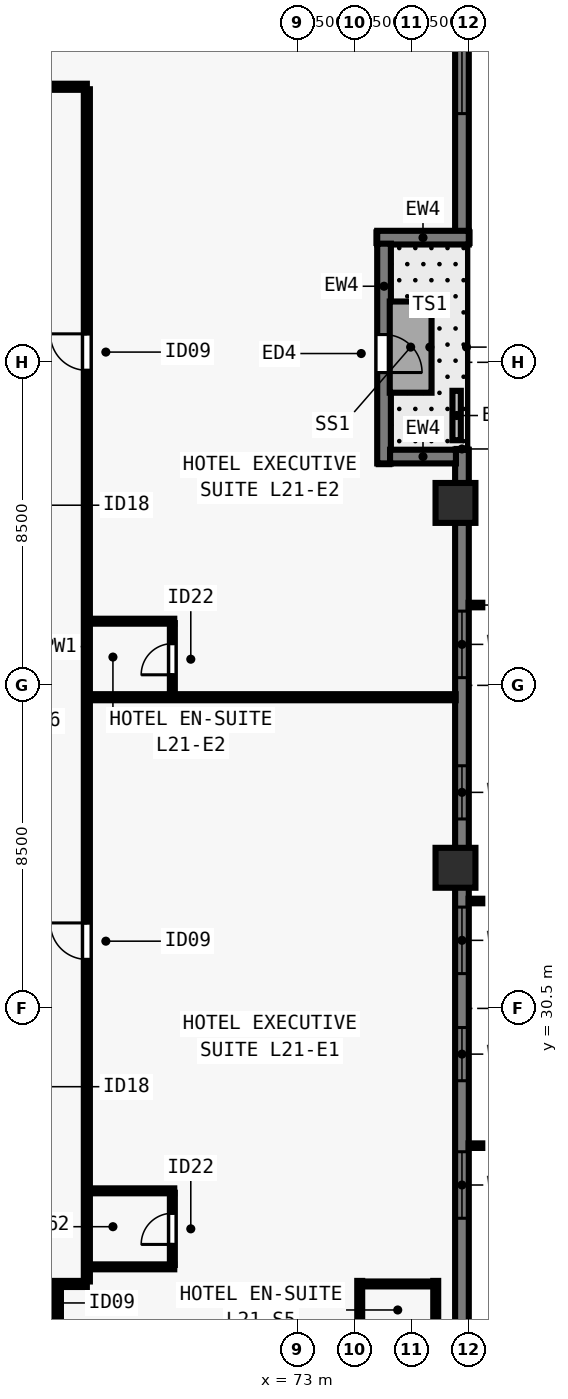
"""IFC4 building model, lengths in metres.
Left out: names, types, materials, properties, quantities, classifications, styles, units other than length and angle.
Written with IfcOpenShell. Run it as: python <this file> out.ifc"""

import sys

from ifc_helpers import new_model, si_unit, direction, frame, frame_2d, origin, origin_2d, place, context, subcontext, project, spatial, rectangle, extrude, element, fill, save


model = new_model("IFC4")
c1 = context("Model", 3, precision=1e-05, world=origin(), true_north=direction((0.0, 1.0)))
c2 = subcontext(c1, "Body", "Model", "MODEL_VIEW")
j1 = project(units=[si_unit("LENGTHUNIT", "METRE"), si_unit("PLANEANGLEUNIT", "RADIAN")], contexts=[c1])
p1 = place(None, origin())
s1 = spatial("IfcSite", under=j1, at=p1, CompositionType="ELEMENT")
p2 = place(p1, origin())
s2 = spatial("IfcBuilding", under=s1, at=p2, CompositionType="ELEMENT")
p3 = place(p2, frame((0.0, 0.0, 79.5)))
s3 = spatial("IfcBuildingStorey", under=s2, at=p3, CompositionType="ELEMENT", Elevation=79.5)
for number, where, z_axis, x_axis in (
    (1, (77.15, 34.2, 0.0), (0.0, 0.0, 1.0), (0.0, 1.0, 0.0)),
    (2, (77.15, 43.8, 0.0), (0.0, 0.0, 1.0), (0.0, 1.0, 0.0)),
):
    element("IfcColumn", number, at=place(p3, frame(where, z_axis=z_axis, x_axis=x_axis)), inside=s3, PredefinedType="COLUMN", context=c2, shape_type="SweptSolid", body=[
        extrude(rectangle(XDim=1.05, YDim=1.05, at=origin_2d()), origin(), (0.0, 0.0, 1.0), 3.5),
    ])
p4 = place(p3, frame((77.32, 45.2, 0.0), z_axis=(0.0, 0.0, 1.0), x_axis=(0.0, -1.0, 0.0)))
e3 = element("IfcWall", 3, at=p4, inside=s3, PredefinedType="SOLIDWALL", context=c2, shape_type="SweptSolid", body=[
    extrude(rectangle(XDim=28.362, YDim=0.36, at=frame_2d((14.181, 0.0))), origin(), (0.0, 0.0, 1.0), 3.28),
])
p5 = place(p4, frame((4.247, 0.0, 0.8)))
e4 = element("IfcOpeningElement", 4, at=p5, cuts=e3, PredefinedType="OPENING", context=c2, shape_type="SweptSolid", body=[
    extrude(rectangle(XDim=1.75, YDim=1.544, at=frame_2d((0.875, 0.772))), frame((0.0, 0.19, 0.0), z_axis=(0.0, -1.0, 0.0), x_axis=(1.0, 0.0, 0.0)), (0.0, 0.0, 1.0), 0.38),
])
p6 = place(p4, frame((8.315, 0.0, 0.8)))
e5 = element("IfcOpeningElement", 5, at=p6, cuts=e3, PredefinedType="OPENING", context=c2, shape_type="SweptSolid", body=[
    extrude(rectangle(XDim=1.4, YDim=1.544, at=frame_2d((0.7, 0.772))), frame((0.0, 0.19, 0.0), z_axis=(0.0, -1.0, 0.0), x_axis=(1.0, 0.0, 0.0)), (0.0, 0.0, 1.0), 0.38),
])
p7 = place(p4, frame((12.034, 0.0, 0.8)))
e6 = element("IfcOpeningElement", 6, at=p7, cuts=e3, PredefinedType="OPENING", context=c2, shape_type="SweptSolid", body=[
    extrude(rectangle(XDim=1.75, YDim=1.544, at=frame_2d((0.875, 0.772))), frame((0.0, 0.19, 0.0), z_axis=(0.0, -1.0, 0.0), x_axis=(1.0, 0.0, 0.0)), (0.0, 0.0, 1.0), 0.38),
])
p8 = place(p4, frame((15.203, 0.0, 0.8)))
e7 = element("IfcOpeningElement", 7, at=p8, cuts=e3, PredefinedType="OPENING", context=c2, shape_type="SweptSolid", body=[
    extrude(rectangle(XDim=1.4, YDim=1.544, at=frame_2d((0.7, 0.772))), frame((0.0, 0.19, 0.0), z_axis=(0.0, -1.0, 0.0), x_axis=(1.0, 0.0, 0.0)), (0.0, 0.0, 1.0), 0.38),
])
p9 = place(p4, frame((18.471, 0.0, 0.8)))
e8 = element("IfcOpeningElement", 8, at=p9, cuts=e3, PredefinedType="OPENING", context=c2, shape_type="SweptSolid", body=[
    extrude(rectangle(XDim=1.75, YDim=1.544, at=frame_2d((0.875, 0.772))), frame((0.0, 0.19, 0.0), z_axis=(0.0, -1.0, 0.0), x_axis=(1.0, 0.0, 0.0)), (0.0, 0.0, 1.0), 0.38),
])
p10 = place(p3, frame((77.32, 61.5, 0.0), z_axis=(0.0, 0.0, 1.0), x_axis=(0.0, -1.0, 0.0)))
e9 = element("IfcWall", 9, at=p10, inside=s3, PredefinedType="SOLIDWALL", context=c2, shape_type="SweptSolid", body=[
    extrude(rectangle(XDim=10.562, YDim=0.36, at=frame_2d((5.281, 0.0))), origin(), (0.0, 0.0, 1.0), 3.28),
])
p11 = place(p10, frame((5.706, 0.0, 0.8)))
e10 = element("IfcOpeningElement", 10, at=p11, cuts=e9, PredefinedType="OPENING", context=c2, shape_type="SweptSolid", body=[
    extrude(rectangle(XDim=1.75, YDim=1.544, at=frame_2d((0.875, 0.772))), frame((0.0, 0.19, 0.0), z_axis=(0.0, -1.0, 0.0), x_axis=(1.0, 0.0, 0.0)), (0.0, 0.0, 1.0), 0.38),
])
p12 = place(p3, frame((77.5, 50.78, 0.0), z_axis=(0.0, 0.0, 1.0), x_axis=(-1.0, 0.0, 0.0)))
e11 = element("IfcWall", 11, at=p12, inside=s3, PredefinedType="SOLIDWALL", context=c2, shape_type="SweptSolid", body=[
    extrude(rectangle(XDim=2.41, YDim=0.36, at=frame_2d((1.205, 0.0))), origin(), (0.0, 0.0, 1.0), 3.28),
])
p13 = place(p3, frame((75.27, 50.622, 0.0), z_axis=(0.0, 0.0, 1.0), x_axis=(0.0, -1.0, 0.0)))
e12 = element("IfcWall", 12, at=p13, inside=s3, PredefinedType="SOLIDWALL", context=c2, shape_type="SweptSolid", body=[
    extrude(rectangle(XDim=5.782, YDim=0.36, at=frame_2d((2.891, 0.0))), origin(), (0.0, 0.0, 1.0), 3.28),
])
p14 = place(p13, frame((2.391, 0.0, 0.0)))
e13 = element("IfcOpeningElement", 13, at=p14, cuts=e12, PredefinedType="OPENING", context=c2, shape_type="SweptSolid", body=[
    extrude(rectangle(XDim=1.0, YDim=2.15, at=frame_2d((0.5, 1.075))), frame((0.0, 0.19, 0.0), z_axis=(0.0, -1.0, 0.0), x_axis=(1.0, 0.0, 0.0)), (0.0, 0.0, 1.0), 0.38),
])
p15 = place(p3, frame((75.428, 45.02, 0.0), z_axis=(0.0, 0.0, 1.0), x_axis=(1.0, 0.0, 0.0)))
e14 = element("IfcWall", 14, at=p15, inside=s3, PredefinedType="SOLIDWALL", context=c2, shape_type="SweptSolid", body=[
    extrude(rectangle(XDim=1.734, YDim=0.36, at=frame_2d((0.867, 0.0))), origin(), (0.0, 0.0, 1.0), 3.28),
])
p16 = place(p3, frame((77.18, 45.45, 0.0), z_axis=(0.0, 0.0, 1.0), x_axis=(0.0, 1.0, 0.0)))
e15 = element("IfcWall", 15, at=p16, inside=s3, PredefinedType="PARAPET", context=c2, shape_type="SweptSolid", body=[
    extrude(rectangle(XDim=1.3, YDim=0.22, at=frame_2d((0.65, 0.0))), origin(), (0.0, 0.0, 1.0), 0.55),
])
p17 = place(p3, frame((36.55, 23.25, 0.0), z_axis=(0.0, 0.0, 1.0), x_axis=(1.0, 0.0, 0.0)))
e16 = element("IfcWall", 16, at=p17, inside=s3, PredefinedType="PARTITIONING", context=c2, shape_type="SweptSolid", body=[
    extrude(rectangle(XDim=30.9, YDim=0.16, at=frame_2d((15.45, 0.0))), origin(), (0.0, 0.0, 1.0), 3.28),
])
p18 = place(p17, frame((1.13, 0.0, 0.0)))
e17 = element("IfcOpeningElement", 17, at=p18, cuts=e16, PredefinedType="OPENING", context=c2, shape_type="SweptSolid", body=[
    extrude(rectangle(XDim=0.96, YDim=2.15, at=frame_2d((0.48, 1.075))), frame((0.0, 0.09, 0.0), z_axis=(0.0, -1.0, 0.0), x_axis=(1.0, 0.0, 0.0)), (0.0, 0.0, 1.0), 0.18),
])
p19 = place(p17, frame((6.093, 0.0, 0.0)))
e18 = element("IfcOpeningElement", 18, at=p19, cuts=e16, PredefinedType="OPENING", context=c2, shape_type="SweptSolid", body=[
    extrude(rectangle(XDim=0.96, YDim=2.15, at=frame_2d((0.48, 1.075))), frame((0.0, 0.09, 0.0), z_axis=(0.0, -1.0, 0.0), x_axis=(1.0, 0.0, 0.0)), (0.0, 0.0, 1.0), 0.18),
])
p20 = place(p17, frame((16.125, 0.0, 0.0)))
e19 = element("IfcOpeningElement", 19, at=p20, cuts=e16, PredefinedType="OPENING", context=c2, shape_type="SweptSolid", body=[
    extrude(rectangle(XDim=0.96, YDim=2.15, at=frame_2d((0.48, 1.075))), frame((0.0, 0.09, 0.0), z_axis=(0.0, -1.0, 0.0), x_axis=(1.0, 0.0, 0.0)), (0.0, 0.0, 1.0), 0.18),
])
p21 = place(p17, frame((26.157, 0.0, 0.0)))
e20 = element("IfcOpeningElement", 20, at=p21, cuts=e16, PredefinedType="OPENING", context=c2, shape_type="SweptSolid", body=[
    extrude(rectangle(XDim=0.96, YDim=2.15, at=frame_2d((0.48, 1.075))), frame((0.0, 0.09, 0.0), z_axis=(0.0, -1.0, 0.0), x_axis=(1.0, 0.0, 0.0)), (0.0, 0.0, 1.0), 0.18),
])
p22 = place(p17, frame((28.92, 0.0, 0.0)))
e21 = element("IfcOpeningElement", 21, at=p22, cuts=e16, PredefinedType="OPENING", context=c2, shape_type="SweptSolid", body=[
    extrude(rectangle(XDim=0.96, YDim=2.15, at=frame_2d((0.48, 1.075))), frame((0.0, 0.09, 0.0), z_axis=(0.0, -1.0, 0.0), x_axis=(1.0, 0.0, 0.0)), (0.0, 0.0, 1.0), 0.18),
])
p23 = place(p3, frame((36.55, 54.75, 0.0), z_axis=(0.0, 0.0, 1.0), x_axis=(1.0, 0.0, 0.0)))
e22 = element("IfcWall", 22, at=p23, inside=s3, PredefinedType="PARTITIONING", context=c2, shape_type="SweptSolid", body=[
    extrude(rectangle(XDim=30.9, YDim=0.16, at=frame_2d((15.45, 0.0))), origin(), (0.0, 0.0, 1.0), 3.28),
])
p24 = place(p23, frame((2.83, 0.0, 0.0)))
e23 = element("IfcOpeningElement", 23, at=p24, cuts=e22, PredefinedType="OPENING", context=c2, shape_type="SweptSolid", body=[
    extrude(rectangle(XDim=0.96, YDim=2.15, at=frame_2d((0.48, 1.075))), frame((0.0, 0.09, 0.0), z_axis=(0.0, -1.0, 0.0), x_axis=(1.0, 0.0, 0.0)), (0.0, 0.0, 1.0), 0.18),
])
p25 = place(p23, frame((15.965, 0.0, 0.0)))
e24 = element("IfcOpeningElement", 24, at=p25, cuts=e22, PredefinedType="OPENING", context=c2, shape_type="SweptSolid", body=[
    extrude(rectangle(XDim=0.96, YDim=2.15, at=frame_2d((0.48, 1.075))), frame((0.0, 0.09, 0.0), z_axis=(0.0, -1.0, 0.0), x_axis=(1.0, 0.0, 0.0)), (0.0, 0.0, 1.0), 0.18),
])
p26 = place(p23, frame((28.105, 0.0, 0.0)))
e25 = element("IfcOpeningElement", 25, at=p26, cuts=e22, PredefinedType="OPENING", context=c2, shape_type="SweptSolid", body=[
    extrude(rectangle(XDim=0.96, YDim=2.15, at=frame_2d((0.48, 1.075))), frame((0.0, 0.09, 0.0), z_axis=(0.0, -1.0, 0.0), x_axis=(1.0, 0.0, 0.0)), (0.0, 0.0, 1.0), 0.18),
])
p27 = place(p3, frame((67.45, 23.315, 0.0), z_axis=(0.0, 0.0, 1.0), x_axis=(0.0, 1.0, 0.0)))
e26 = element("IfcWall", 26, at=p27, inside=s3, PredefinedType="PARTITIONING", context=c2, shape_type="SweptSolid", body=[
    extrude(rectangle(XDim=31.37, YDim=0.16, at=frame_2d((15.685, 0.0))), origin(), (0.0, 0.0, 1.0), 3.28),
])
p28 = place(p27, frame((8.474, 0.0, 0.0)))
e27 = element("IfcOpeningElement", 27, at=p28, cuts=e26, PredefinedType="OPENING", context=c2, shape_type="SweptSolid", body=[
    extrude(rectangle(XDim=0.96, YDim=2.15, at=frame_2d((0.48, 1.075))), frame((0.0, 0.09, 0.0), z_axis=(0.0, -1.0, 0.0), x_axis=(1.0, 0.0, 0.0)), (0.0, 0.0, 1.0), 0.18),
])
p29 = place(p27, frame((23.974, 0.0, 0.0)))
e28 = element("IfcOpeningElement", 28, at=p29, cuts=e26, PredefinedType="OPENING", context=c2, shape_type="SweptSolid", body=[
    extrude(rectangle(XDim=0.96, YDim=2.15, at=frame_2d((0.48, 1.075))), frame((0.0, 0.09, 0.0), z_axis=(0.0, -1.0, 0.0), x_axis=(1.0, 0.0, 0.0)), (0.0, 0.0, 1.0), 0.18),
])
p30 = place(p3, frame((66.688, 13.845, 0.0), z_axis=(0.0, 0.0, 1.0), x_axis=(0.0, 1.0, 0.0)))
e29 = element("IfcWall", 29, at=p30, inside=s3, PredefinedType="PARTITIONING", context=c2, shape_type="SweptSolid", body=[
    extrude(rectangle(XDim=9.34, YDim=0.16, at=frame_2d((4.67, 0.0))), origin(), (0.0, 0.0, 1.0), 2.439),
])
for number, where, z_axis, x_axis in (
    (30, (76.63, 20.95, 0.0), (0.0, 0.0, 1.0), (0.0, 1.0, 0.0)),
    (31, (74.63, 20.95, 0.0), (0.0, 0.0, 1.0), (0.0, 1.0, 0.0)),
):
    element("IfcWall", number, at=place(p3, frame(where, z_axis=z_axis, x_axis=x_axis)), inside=s3, PredefinedType="PLUMBINGWALL", context=c2, shape_type="SweptSolid", body=[
        extrude(rectangle(XDim=2.38, YDim=0.13, at=frame_2d((1.19, 0.0))), origin(), (0.0, 0.0, 1.0), 3.28),
    ])
p31 = place(p3, frame((74.68, 23.25, 0.0), z_axis=(0.0, 0.0, 1.0), x_axis=(1.0, 0.0, 0.0)))
e32 = element("IfcWall", 32, at=p31, inside=s3, PredefinedType="PLUMBINGWALL", context=c2, shape_type="SweptSolid", body=[
    extrude(rectangle(XDim=1.9, YDim=0.13, at=frame_2d((0.95, 0.0))), origin(), (0.0, 0.0, 1.0), 3.28),
])
p32 = place(p3, frame((67.515, 23.7, 0.0), z_axis=(0.0, 0.0, 1.0), x_axis=(1.0, 0.0, 0.0)))
e33 = element("IfcWall", 33, at=p32, inside=s3, PredefinedType="PLUMBINGWALL", context=c2, shape_type="SweptSolid", body=[
    extrude(rectangle(XDim=2.235, YDim=0.13, at=frame_2d((1.118, 0.0))), origin(), (0.0, 0.0, 1.0), 2.849),
])
p33 = place(p3, frame((67.515, 25.7, 0.0), z_axis=(0.0, 0.0, 1.0), x_axis=(1.0, 0.0, 0.0)))
e34 = element("IfcWall", 34, at=p33, inside=s3, PredefinedType="PLUMBINGWALL", context=c2, shape_type="SweptSolid", body=[
    extrude(rectangle(XDim=2.235, YDim=0.13, at=frame_2d((1.118, 0.0))), origin(), (0.0, 0.0, 1.0), 3.28),
])
p34 = place(p3, frame((69.7, 23.75, 0.0), z_axis=(0.0, 0.0, 1.0), x_axis=(0.0, 1.0, 0.0)))
e35 = element("IfcWall", 35, at=p34, inside=s3, PredefinedType="PLUMBINGWALL", context=c2, shape_type="SweptSolid", body=[
    extrude(rectangle(XDim=1.9, YDim=0.13, at=frame_2d((0.95, 0.0))), origin(), (0.0, 0.0, 1.0), 3.28),
])
p35 = place(p34, frame((0.54, 0.0, 0.0)))
e36 = element("IfcOpeningElement", 36, at=p35, cuts=e35, PredefinedType="OPENING", context=c2, shape_type="SweptSolid", body=[
    extrude(rectangle(XDim=0.82, YDim=2.1, at=frame_2d((0.41, 1.05))), frame((0.0, 0.075, 0.0), z_axis=(0.0, -1.0, 0.0), x_axis=(1.0, 0.0, 0.0)), (0.0, 0.0, 1.0), 0.15),
])
p36 = place(p3, frame((67.515, 38.688, 0.0), z_axis=(0.0, 0.0, 1.0), x_axis=(1.0, 0.0, 0.0)))
e37 = element("IfcWall", 37, at=p36, inside=s3, PredefinedType="PARTITIONING", context=c2, shape_type="SweptSolid", body=[
    extrude(rectangle(XDim=9.64, YDim=0.16, at=frame_2d((4.82, 0.0))), origin(), (0.0, 0.0, 1.0), 3.28),
])
p37 = place(p3, frame((67.515, 40.688, 0.0), z_axis=(0.0, 0.0, 1.0), x_axis=(1.0, 0.0, 0.0)))
e38 = element("IfcWall", 38, at=p37, inside=s3, PredefinedType="PLUMBINGWALL", context=c2, shape_type="SweptSolid", body=[
    extrude(rectangle(XDim=2.235, YDim=0.13, at=frame_2d((1.118, 0.0))), origin(), (0.0, 0.0, 1.0), 3.28),
])
p38 = place(p3, frame((69.7, 38.753, 0.0), z_axis=(0.0, 0.0, 1.0), x_axis=(0.0, 1.0, 0.0)))
e39 = element("IfcWall", 39, at=p38, inside=s3, PredefinedType="PLUMBINGWALL", context=c2, shape_type="SweptSolid", body=[
    extrude(rectangle(XDim=1.885, YDim=0.13, at=frame_2d((0.942, 0.0))), origin(), (0.0, 0.0, 1.0), 3.28),
])
p39 = place(p38, frame((0.525, 0.0, 0.0)))
e40 = element("IfcOpeningElement", 40, at=p39, cuts=e39, PredefinedType="OPENING", context=c2, shape_type="SweptSolid", body=[
    extrude(rectangle(XDim=0.82, YDim=2.1, at=frame_2d((0.41, 1.05))), frame((0.0, 0.075, 0.0), z_axis=(0.0, -1.0, 0.0), x_axis=(1.0, 0.0, 0.0)), (0.0, 0.0, 1.0), 0.15),
])
p40 = place(p5, origin())
e41 = element("IfcWindow", 41, at=p40, inside=s3, PartitioningType="SINGLE_PANEL", PredefinedType="WINDOW", context=c2, shape_type="SweptSolid", body=[
    extrude(rectangle(XDim=1.75, YDim=1.544, at=frame_2d((0.875, 0.772))), frame((0.0, -0.05, 0.0), z_axis=(0.0, -1.0, 0.0), x_axis=(1.0, 0.0, 0.0)), (0.0, 0.0, 1.0), 0.06),
])
fill(e4, e41)
p41 = place(p6, origin())
e42 = element("IfcWindow", 42, at=p41, inside=s3, PartitioningType="SINGLE_PANEL", PredefinedType="WINDOW", context=c2, shape_type="SweptSolid", body=[
    extrude(rectangle(XDim=1.4, YDim=1.544, at=frame_2d((0.7, 0.772))), frame((0.0, -0.05, 0.0), z_axis=(0.0, -1.0, 0.0), x_axis=(1.0, 0.0, 0.0)), (0.0, 0.0, 1.0), 0.06),
])
fill(e5, e42)
p42 = place(p7, origin())
e43 = element("IfcWindow", 43, at=p42, inside=s3, PartitioningType="SINGLE_PANEL", PredefinedType="WINDOW", context=c2, shape_type="SweptSolid", body=[
    extrude(rectangle(XDim=1.75, YDim=1.544, at=frame_2d((0.875, 0.772))), frame((0.0, -0.05, 0.0), z_axis=(0.0, -1.0, 0.0), x_axis=(1.0, 0.0, 0.0)), (0.0, 0.0, 1.0), 0.06),
])
fill(e6, e43)
p43 = place(p8, origin())
e44 = element("IfcWindow", 44, at=p43, inside=s3, PartitioningType="SINGLE_PANEL", PredefinedType="WINDOW", context=c2, shape_type="SweptSolid", body=[
    extrude(rectangle(XDim=1.4, YDim=1.544, at=frame_2d((0.7, 0.772))), frame((0.0, -0.05, 0.0), z_axis=(0.0, -1.0, 0.0), x_axis=(1.0, 0.0, 0.0)), (0.0, 0.0, 1.0), 0.06),
])
fill(e7, e44)
p44 = place(p9, origin())
e45 = element("IfcWindow", 45, at=p44, inside=s3, PartitioningType="SINGLE_PANEL", PredefinedType="WINDOW", context=c2, shape_type="SweptSolid", body=[
    extrude(rectangle(XDim=1.75, YDim=1.544, at=frame_2d((0.875, 0.772))), frame((0.0, -0.05, 0.0), z_axis=(0.0, -1.0, 0.0), x_axis=(1.0, 0.0, 0.0)), (0.0, 0.0, 1.0), 0.06),
])
fill(e8, e45)
p45 = place(p11, origin())
e46 = element("IfcWindow", 46, at=p45, inside=s3, PartitioningType="SINGLE_PANEL", PredefinedType="WINDOW", context=c2, shape_type="SweptSolid", body=[
    extrude(rectangle(XDim=1.75, YDim=1.544, at=frame_2d((0.875, 0.772))), frame((0.0, -0.05, 0.0), z_axis=(0.0, -1.0, 0.0), x_axis=(1.0, 0.0, 0.0)), (0.0, 0.0, 1.0), 0.06),
])
fill(e10, e46)
p46 = place(p14, origin())
e47 = element("IfcDoor", 47, at=p46, inside=s3, OperationType="SINGLE_SWING_RIGHT", PredefinedType="DOOR", context=c2, shape_type="SweptSolid", body=[
    extrude(rectangle(XDim=1.0, YDim=2.15, at=frame_2d((0.5, 1.075))), frame((0.0, 0.025, 0.0), z_axis=(0.0, -1.0, 0.0), x_axis=(1.0, 0.0, 0.0)), (0.0, 0.0, 1.0), 0.05),
])
fill(e13, e47)
p47 = place(p35, origin())
e48 = element("IfcDoor", 48, at=p47, inside=s3, OperationType="SINGLE_SWING_LEFT", PredefinedType="DOOR", context=c2, shape_type="SweptSolid", body=[
    extrude(rectangle(XDim=0.82, YDim=2.1, at=frame_2d((0.41, 1.05))), frame((0.0, 0.025, 0.0), z_axis=(0.0, -1.0, 0.0), x_axis=(1.0, 0.0, 0.0)), (0.0, 0.0, 1.0), 0.05),
])
fill(e36, e48)
p48 = place(p28, origin())
e49 = element("IfcDoor", 49, at=p48, inside=s3, OperationType="SINGLE_SWING_RIGHT", PredefinedType="DOOR", context=c2, shape_type="SweptSolid", body=[
    extrude(rectangle(XDim=0.96, YDim=2.15, at=frame_2d((0.48, 1.075))), frame((0.0, 0.025, 0.0), z_axis=(0.0, -1.0, 0.0), x_axis=(1.0, 0.0, 0.0)), (0.0, 0.0, 1.0), 0.05),
])
fill(e27, e49)
p49 = place(p39, origin())
e50 = element("IfcDoor", 50, at=p49, inside=s3, OperationType="SINGLE_SWING_LEFT", PredefinedType="DOOR", context=c2, shape_type="SweptSolid", body=[
    extrude(rectangle(XDim=0.82, YDim=2.1, at=frame_2d((0.41, 1.05))), frame((0.0, 0.025, 0.0), z_axis=(0.0, -1.0, 0.0), x_axis=(1.0, 0.0, 0.0)), (0.0, 0.0, 1.0), 0.05),
])
fill(e40, e50)
p50 = place(p29, origin())
e51 = element("IfcDoor", 51, at=p50, inside=s3, OperationType="SINGLE_SWING_RIGHT", PredefinedType="DOOR", context=c2, shape_type="SweptSolid", body=[
    extrude(rectangle(XDim=0.96, YDim=2.15, at=frame_2d((0.48, 1.075))), frame((0.0, 0.025, 0.0), z_axis=(0.0, -1.0, 0.0), x_axis=(1.0, 0.0, 0.0)), (0.0, 0.0, 1.0), 0.05),
])
fill(e28, e51)
save(model, sys.argv[1])
